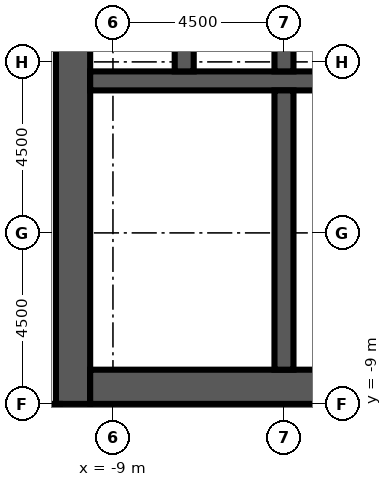
"""IFC4 building model, lengths in metres.
Left out: names, types, materials, properties, quantities, classifications, styles, units other than length and angle.
Written with IfcOpenShell. Run it as: python <this file> out.ifc"""

import sys

from ifc_helpers import new_model, si_unit, direction, frame, frame_2d, origin, place, context, subcontext, project, spatial, rectangle, extrude, element, fill, save


model = new_model("IFC4")
c1 = context("Model", 3, precision=1e-05, world=origin(), true_north=direction((0.0, 1.0)))
c2 = subcontext(c1, "Body", "Model", "MODEL_VIEW")
j1 = project(units=[si_unit("LENGTHUNIT", "METRE"), si_unit("PLANEANGLEUNIT", "RADIAN")], contexts=[c1])
p1 = place(None, origin())
s1 = spatial("IfcSite", under=j1, at=p1, CompositionType="ELEMENT")
p2 = place(p1, origin())
s2 = spatial("IfcBuilding", under=s1, at=p2, CompositionType="ELEMENT")
p3 = place(p2, frame((0.0, 0.0, 110.7)))
s3 = spatial("IfcBuildingStorey", under=s2, at=p3, CompositionType="ELEMENT", Elevation=110.7)
p4 = place(p3, frame((-10.05, -9.0, 0.0), z_axis=(0.0, 0.0, 1.0), x_axis=(0.0, 1.0, 0.0)))
e1 = element("IfcWall", 1, at=p4, inside=s3, PredefinedType="SHEAR", context=c2, shape_type="SweptSolid", body=[
    extrude(rectangle(XDim=27.5, YDim=0.9, at=frame_2d((13.75, 0.0))), origin(), (0.0, 0.0, 1.0), 6.0),
])
p5 = place(p4, frame((12.55, 0.0, 0.0)))
e2 = element("IfcOpeningElement", 2, at=p5, cuts=e1, PredefinedType="OPENING", context=c2, shape_type="SweptSolid", body=[
    extrude(rectangle(XDim=2.4, YDim=2.4, at=frame_2d((1.2, 1.2))), frame((0.0, 0.46, 0.0), z_axis=(0.0, -1.0, 0.0), x_axis=(1.0, 0.0, 0.0)), (0.0, 0.0, 1.0), 0.92),
])
p6 = place(p4, frame((6.825, 0.0, 0.0)))
e3 = element("IfcOpeningElement", 3, at=p6, cuts=e1, PredefinedType="OPENING", context=c2, shape_type="SweptSolid", body=[
    extrude(rectangle(XDim=1.2, YDim=2.1, at=frame_2d((0.6, 1.05))), frame((0.0, 0.46, 0.0), z_axis=(0.0, -1.0, 0.0), x_axis=(1.0, 0.0, 0.0)), (0.0, 0.0, 1.0), 0.92),
])
p7 = place(p4, frame((19.475, 0.0, 0.0)))
e4 = element("IfcOpeningElement", 4, at=p7, cuts=e1, PredefinedType="OPENING", context=c2, shape_type="SweptSolid", body=[
    extrude(rectangle(XDim=1.2, YDim=2.1, at=frame_2d((0.6, 1.05))), frame((0.0, 0.46, 0.0), z_axis=(0.0, -1.0, 0.0), x_axis=(1.0, 0.0, 0.0)), (0.0, 0.0, 1.0), 0.92),
])
p8 = place(p3, frame((-9.6, -8.55, 0.0), z_axis=(0.0, 0.0, 1.0), x_axis=(1.0, 0.0, 0.0)))
e5 = element("IfcWall", 5, at=p8, inside=s3, PredefinedType="SHEAR", context=c2, shape_type="SweptSolid", body=[
    extrude(rectangle(XDim=10.2, YDim=0.9, at=frame_2d((5.1, 0.0))), origin(), (0.0, 0.0, 1.0), 6.0),
])
p9 = place(p3, frame((-9.6, -0.5, 0.0), z_axis=(0.0, 0.0, 1.0), x_axis=(1.0, 0.0, 0.0)))
e6 = element("IfcWall", 6, at=p9, inside=s3, PredefinedType="SHEAR", context=c2, shape_type="SweptSolid", body=[
    extrude(rectangle(XDim=10.2, YDim=0.5, at=frame_2d((5.1, 0.0))), origin(), (0.0, 0.0, 1.0), 6.0),
])
for number, where, z_axis, x_axis in (
    (7, (-7.125, -0.25, 0.0), (0.0, 0.0, 1.0), (0.0, 1.0, 0.0)),
    (8, (-4.5, -0.25, 0.0), (0.0, 0.0, 1.0), (0.0, 1.0, 0.0)),
):
    element("IfcWall", number, at=place(p3, frame(where, z_axis=z_axis, x_axis=x_axis)), inside=s3, PredefinedType="SHEAR", context=c2, shape_type="SweptSolid", body=[
        extrude(rectangle(XDim=2.8, YDim=0.5, at=frame_2d((1.4, 0.0))), origin(), (0.0, 0.0, 1.0), 6.0),
    ])
p10 = place(p3, frame((-4.5, -8.1, 0.0), z_axis=(0.0, 0.0, 1.0), x_axis=(0.0, 1.0, 0.0)))
e9 = element("IfcWall", 9, at=p10, inside=s3, PredefinedType="SHEAR", context=c2, shape_type="SweptSolid", body=[
    extrude(rectangle(XDim=7.35, YDim=0.5, at=frame_2d((3.675, 0.0))), origin(), (0.0, 0.0, 1.0), 6.0),
])
for number, where, z_axis, x_axis in (
    (10, (-4.25, -5.895, 0.0), (0.0, 0.0, 1.0), (1.0, 0.0, 0.0)),
    (11, (-4.25, -2.955, 0.0), (0.0, 0.0, 1.0), (1.0, 0.0, 0.0)),
):
    element("IfcWall", number, at=place(p3, frame(where, z_axis=z_axis, x_axis=x_axis)), inside=s3, PredefinedType="PARTITIONING", context=c2, shape_type="SweptSolid", body=[
        extrude(rectangle(XDim=3.25, YDim=0.1, at=frame_2d((1.625, 0.0))), origin(), (0.0, 0.0, 1.0), 5.55),
    ])
p11 = place(p3, frame((-10.5, -9.45, 0.0), z_axis=(0.0, 0.0, 1.0), x_axis=(0.0, 1.0, 0.0)))
e12 = element("IfcWall", 12, at=p11, inside=s3, PredefinedType="PARTITIONING", context=c2, shape_type="SweptSolid", body=[
    extrude(rectangle(XDim=0.45, YDim=0.2, at=frame_2d((0.225, 0.0))), origin(), (0.0, 0.0, 1.0), 3.72),
])
p12 = place(p6, origin())
e13 = element("IfcDoor", 13, at=p12, inside=s3, OperationType="SINGLE_SWING_LEFT", PredefinedType="DOOR", context=c2, shape_type="SweptSolid", body=[
    extrude(rectangle(XDim=1.2, YDim=2.1, at=frame_2d((0.6, 1.05))), frame((0.0, 0.025, 0.0), z_axis=(0.0, -1.0, 0.0), x_axis=(1.0, 0.0, 0.0)), (0.0, 0.0, 1.0), 0.05),
])
fill(e3, e13)
save(model, sys.argv[1])
